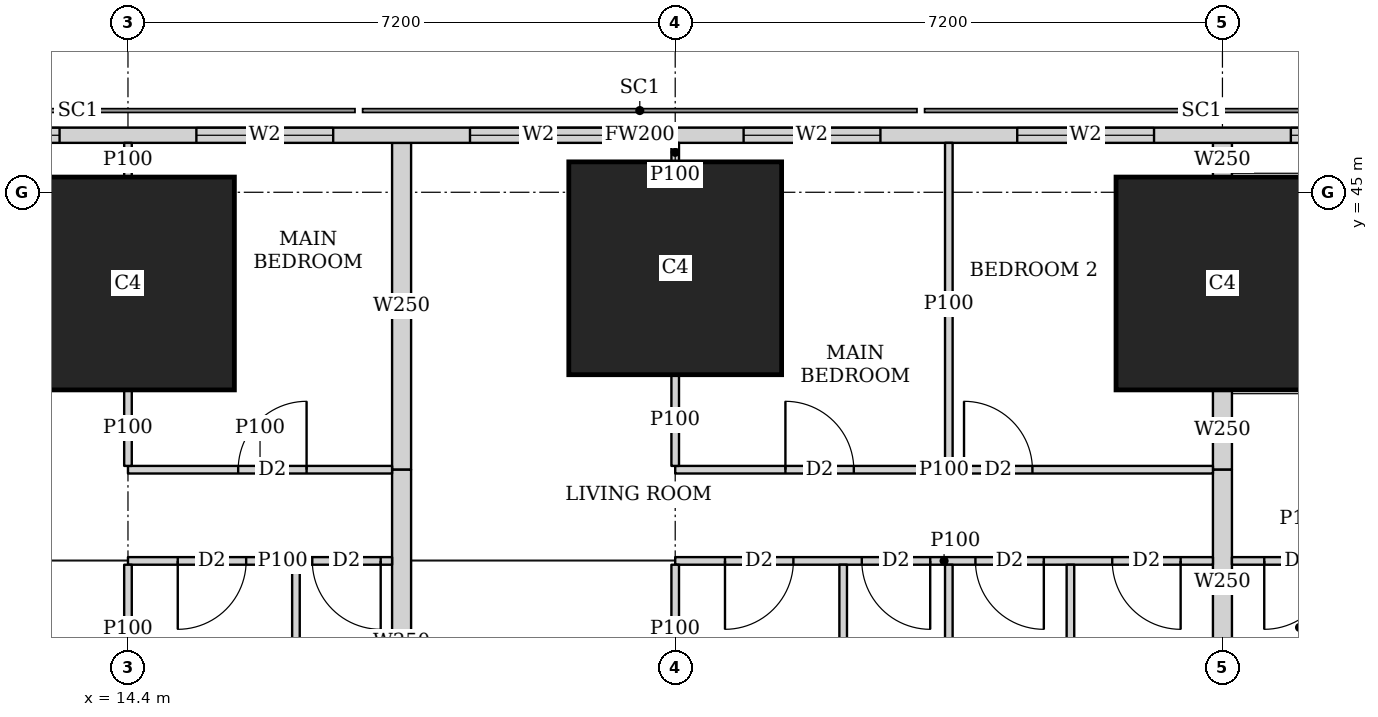
"""IFC4 building model, lengths in metres.
Left out: names, types, materials, properties, quantities, classifications, styles, units other than length and angle.
Written with IfcOpenShell. Run it as: python <this file> out.ifc"""

import sys

from ifc_helpers import new_model, si_unit, direction, frame, frame_2d, origin, origin_2d, place, context, subcontext, project, spatial, rectangle, extrude, element, fill, save


model = new_model("IFC4")
c1 = context("Model", 3, precision=1e-05, world=origin(), true_north=direction((0.0, 1.0)))
c2 = subcontext(c1, "Body", "Model", "MODEL_VIEW")
j1 = project(units=[si_unit("LENGTHUNIT", "METRE"), si_unit("PLANEANGLEUNIT", "RADIAN")], contexts=[c1])
p1 = place(None, origin())
s1 = spatial("IfcSite", under=j1, at=p1, CompositionType="ELEMENT")
p2 = place(p1, origin())
s2 = spatial("IfcBuilding", under=s1, at=p2, CompositionType="ELEMENT")
p3 = place(p2, frame((0.0, 0.0, 53.75)))
s3 = spatial("IfcBuildingStorey", under=s2, at=p3, CompositionType="ELEMENT", Elevation=53.75)
for number, where, z_axis, x_axis in (
    (1, (14.4, 43.8, 0.0), (0.0, 0.0, 1.0), (1.0, 0.0, 0.0)),
    (2, (21.6, 44.0, 0.0), (0.0, 0.0, 1.0), (1.0, 0.0, 0.0)),
    (3, (28.8, 43.8, 0.0), (0.0, 0.0, 1.0), (1.0, 0.0, 0.0)),
):
    element("IfcColumn", number, at=place(p3, frame(where, z_axis=z_axis, x_axis=x_axis)), inside=s3, PredefinedType="COLUMN", context=c2, shape_type="SweptSolid", body=[
        extrude(rectangle(XDim=2.8, YDim=2.8, at=origin_2d()), origin(), (0.0, 0.0, 1.0), 3.75),
    ])
p4 = place(p3, frame((40.106, 45.75, 0.0), z_axis=(0.0, 0.0, 1.0), x_axis=(-1.0, 0.0, 0.0)))
e4 = element("IfcWall", 4, at=p4, inside=s3, PredefinedType="SOLIDWALL", context=c2, shape_type="SweptSolid", body=[
    extrude(rectangle(XDim=37.943, YDim=0.2, at=frame_2d((18.971, 0.0))), origin(), (0.0, 0.0, 1.0), 3.5),
])
p5 = place(p4, frame((8.606, 0.0, 0.9)))
e5 = element("IfcOpeningElement", 5, at=p5, cuts=e4, PredefinedType="OPENING", context=c2, shape_type="SweptSolid", body=[
    extrude(rectangle(XDim=1.8, YDim=1.5, at=frame_2d((0.9, 0.75))), frame((0.0, 0.11, 0.0), z_axis=(0.0, -1.0, 0.0), x_axis=(1.0, 0.0, 0.0)), (0.0, 0.0, 1.0), 0.22),
])
p6 = place(p4, frame((12.206, 0.0, 0.9)))
e6 = element("IfcOpeningElement", 6, at=p6, cuts=e4, PredefinedType="OPENING", context=c2, shape_type="SweptSolid", body=[
    extrude(rectangle(XDim=1.8, YDim=1.5, at=frame_2d((0.9, 0.75))), frame((0.0, 0.11, 0.0), z_axis=(0.0, -1.0, 0.0), x_axis=(1.0, 0.0, 0.0)), (0.0, 0.0, 1.0), 0.22),
])
p7 = place(p4, frame((15.806, 0.0, 0.9)))
e7 = element("IfcOpeningElement", 7, at=p7, cuts=e4, PredefinedType="OPENING", context=c2, shape_type="SweptSolid", body=[
    extrude(rectangle(XDim=1.8, YDim=1.5, at=frame_2d((0.9, 0.75))), frame((0.0, 0.11, 0.0), z_axis=(0.0, -1.0, 0.0), x_axis=(1.0, 0.0, 0.0)), (0.0, 0.0, 1.0), 0.22),
])
p8 = place(p4, frame((19.406, 0.0, 0.9)))
e8 = element("IfcOpeningElement", 8, at=p8, cuts=e4, PredefinedType="OPENING", context=c2, shape_type="SweptSolid", body=[
    extrude(rectangle(XDim=1.8, YDim=1.5, at=frame_2d((0.9, 0.75))), frame((0.0, 0.11, 0.0), z_axis=(0.0, -1.0, 0.0), x_axis=(1.0, 0.0, 0.0)), (0.0, 0.0, 1.0), 0.22),
])
p9 = place(p4, frame((23.006, 0.0, 0.9)))
e9 = element("IfcOpeningElement", 9, at=p9, cuts=e4, PredefinedType="OPENING", context=c2, shape_type="SweptSolid", body=[
    extrude(rectangle(XDim=1.8, YDim=1.5, at=frame_2d((0.9, 0.75))), frame((0.0, 0.11, 0.0), z_axis=(0.0, -1.0, 0.0), x_axis=(1.0, 0.0, 0.0)), (0.0, 0.0, 1.0), 0.22),
])
p10 = place(p4, frame((26.606, 0.0, 0.9)))
e10 = element("IfcOpeningElement", 10, at=p10, cuts=e4, PredefinedType="OPENING", context=c2, shape_type="SweptSolid", body=[
    extrude(rectangle(XDim=1.8, YDim=1.5, at=frame_2d((0.9, 0.75))), frame((0.0, 0.11, 0.0), z_axis=(0.0, -1.0, 0.0), x_axis=(1.0, 0.0, 0.0)), (0.0, 0.0, 1.0), 0.22),
])
p11 = place(p3, frame((14.4, 41.35, 0.0), z_axis=(0.0, 0.0, 1.0), x_axis=(1.0, 0.0, 0.0)))
e11 = element("IfcWall", 11, at=p11, inside=s3, PredefinedType="PARTITIONING", context=c2, shape_type="SweptSolid", body=[
    extrude(rectangle(XDim=3.475, YDim=0.1, at=frame_2d((1.738, 0.0))), origin(), (0.0, 0.0, 1.0), 3.5),
])
p12 = place(p11, frame((1.45, 0.0, 0.0)))
e12 = element("IfcOpeningElement", 12, at=p12, cuts=e11, PredefinedType="OPENING", context=c2, shape_type="SweptSolid", body=[
    extrude(rectangle(XDim=0.9, YDim=2.1, at=frame_2d((0.45, 1.05))), frame((0.0, 0.06, 0.0), z_axis=(0.0, -1.0, 0.0), x_axis=(1.0, 0.0, 0.0)), (0.0, 0.0, 1.0), 0.12),
])
p13 = place(p3, frame((14.4, 40.15, 0.0), z_axis=(0.0, 0.0, 1.0), x_axis=(1.0, 0.0, 0.0)))
e13 = element("IfcWall", 13, at=p13, inside=s3, PredefinedType="PARTITIONING", context=c2, shape_type="SweptSolid", body=[
    extrude(rectangle(XDim=3.475, YDim=0.1, at=frame_2d((1.738, 0.0))), origin(), (0.0, 0.0, 1.0), 3.5),
])
p14 = place(p13, frame((0.655, 0.0, 0.0)))
e14 = element("IfcOpeningElement", 14, at=p14, cuts=e13, PredefinedType="OPENING", context=c2, shape_type="SweptSolid", body=[
    extrude(rectangle(XDim=0.9, YDim=2.1, at=frame_2d((0.45, 1.05))), frame((0.0, 0.06, 0.0), z_axis=(0.0, -1.0, 0.0), x_axis=(1.0, 0.0, 0.0)), (0.0, 0.0, 1.0), 0.12),
])
p15 = place(p13, frame((2.425, 0.0, 0.0)))
e15 = element("IfcOpeningElement", 15, at=p15, cuts=e13, PredefinedType="OPENING", context=c2, shape_type="SweptSolid", body=[
    extrude(rectangle(XDim=0.9, YDim=2.1, at=frame_2d((0.45, 1.05))), frame((0.0, 0.06, 0.0), z_axis=(0.0, -1.0, 0.0), x_axis=(1.0, 0.0, 0.0)), (0.0, 0.0, 1.0), 0.12),
])
p16 = place(p3, frame((14.4, 41.4, 0.0), z_axis=(0.0, 0.0, 1.0), x_axis=(0.0, 1.0, 0.0)))
e16 = element("IfcWall", 16, at=p16, inside=s3, PredefinedType="PARTITIONING", context=c2, shape_type="SweptSolid", body=[
    extrude(rectangle(XDim=0.999, YDim=0.1, at=frame_2d((0.5, 0.0))), origin(), (0.0, 0.0, 1.0), 3.5),
])
p17 = place(p3, frame((14.4, 45.201, 0.0), z_axis=(0.0, 0.0, 1.0), x_axis=(0.0, 1.0, 0.0)))
e17 = element("IfcWall", 17, at=p17, inside=s3, PredefinedType="PARTITIONING", context=c2, shape_type="SweptSolid", body=[
    extrude(rectangle(XDim=0.449, YDim=0.1, at=frame_2d((0.225, 0.0))), origin(), (0.0, 0.0, 1.0), 3.5),
])
p18 = place(p3, frame((14.4, 38.401, 0.0), z_axis=(0.0, 0.0, 1.0), x_axis=(0.0, 1.0, 0.0)))
e18 = element("IfcWall", 18, at=p18, inside=s3, PredefinedType="PARTITIONING", context=c2, shape_type="SweptSolid", body=[
    extrude(rectangle(XDim=1.699, YDim=0.1, at=frame_2d((0.85, 0.0))), origin(), (0.0, 0.0, 1.0), 3.5),
])
p19 = place(p3, frame((16.61, 36.825, 0.0), z_axis=(0.0, 0.0, 1.0), x_axis=(0.0, 1.0, 0.0)))
e19 = element("IfcWall", 19, at=p19, inside=s3, PredefinedType="PARTITIONING", context=c2, shape_type="SweptSolid", body=[
    extrude(rectangle(XDim=3.275, YDim=0.1, at=frame_2d((1.638, 0.0))), origin(), (0.0, 0.0, 1.0), 3.5),
])
p20 = place(p3, frame((21.6, 41.35, 0.0), z_axis=(0.0, 0.0, 1.0), x_axis=(1.0, 0.0, 0.0)))
e20 = element("IfcWall", 20, at=p20, inside=s3, PredefinedType="PARTITIONING", context=c2, shape_type="SweptSolid", body=[
    extrude(rectangle(XDim=7.075, YDim=0.1, at=frame_2d((3.538, 0.0))), origin(), (0.0, 0.0, 1.0), 3.5),
])
p21 = place(p20, frame((1.45, 0.0, 0.0)))
e21 = element("IfcOpeningElement", 21, at=p21, cuts=e20, PredefinedType="OPENING", context=c2, shape_type="SweptSolid", body=[
    extrude(rectangle(XDim=0.9, YDim=2.1, at=frame_2d((0.45, 1.05))), frame((0.0, 0.06, 0.0), z_axis=(0.0, -1.0, 0.0), x_axis=(1.0, 0.0, 0.0)), (0.0, 0.0, 1.0), 0.12),
])
p22 = place(p20, frame((3.8, 0.0, 0.0)))
e22 = element("IfcOpeningElement", 22, at=p22, cuts=e20, PredefinedType="OPENING", context=c2, shape_type="SweptSolid", body=[
    extrude(rectangle(XDim=0.9, YDim=2.1, at=frame_2d((0.45, 1.05))), frame((0.0, 0.06, 0.0), z_axis=(0.0, -1.0, 0.0), x_axis=(1.0, 0.0, 0.0)), (0.0, 0.0, 1.0), 0.12),
])
p23 = place(p3, frame((21.6, 40.15, 0.0), z_axis=(0.0, 0.0, 1.0), x_axis=(1.0, 0.0, 0.0)))
e23 = element("IfcWall", 23, at=p23, inside=s3, PredefinedType="PARTITIONING", context=c2, shape_type="SweptSolid", body=[
    extrude(rectangle(XDim=7.075, YDim=0.1, at=frame_2d((3.538, 0.0))), origin(), (0.0, 0.0, 1.0), 3.5),
])
p24 = place(p23, frame((0.655, 0.0, 0.0)))
e24 = element("IfcOpeningElement", 24, at=p24, cuts=e23, PredefinedType="OPENING", context=c2, shape_type="SweptSolid", body=[
    extrude(rectangle(XDim=0.9, YDim=2.1, at=frame_2d((0.45, 1.05))), frame((0.0, 0.06, 0.0), z_axis=(0.0, -1.0, 0.0), x_axis=(1.0, 0.0, 0.0)), (0.0, 0.0, 1.0), 0.12),
])
p25 = place(p23, frame((3.95, 0.0, 0.0)))
e25 = element("IfcOpeningElement", 25, at=p25, cuts=e23, PredefinedType="OPENING", context=c2, shape_type="SweptSolid", body=[
    extrude(rectangle(XDim=0.9, YDim=2.1, at=frame_2d((0.45, 1.05))), frame((0.0, 0.06, 0.0), z_axis=(0.0, -1.0, 0.0), x_axis=(1.0, 0.0, 0.0)), (0.0, 0.0, 1.0), 0.12),
])
p26 = place(p23, frame((2.455, 0.0, 0.0)))
e26 = element("IfcOpeningElement", 26, at=p26, cuts=e23, PredefinedType="OPENING", context=c2, shape_type="SweptSolid", body=[
    extrude(rectangle(XDim=0.9, YDim=2.1, at=frame_2d((0.45, 1.05))), frame((0.0, 0.06, 0.0), z_axis=(0.0, -1.0, 0.0), x_axis=(1.0, 0.0, 0.0)), (0.0, 0.0, 1.0), 0.12),
])
p27 = place(p23, frame((5.75, 0.0, 0.0)))
e27 = element("IfcOpeningElement", 27, at=p27, cuts=e23, PredefinedType="OPENING", context=c2, shape_type="SweptSolid", body=[
    extrude(rectangle(XDim=0.9, YDim=2.1, at=frame_2d((0.45, 1.05))), frame((0.0, 0.06, 0.0), z_axis=(0.0, -1.0, 0.0), x_axis=(1.0, 0.0, 0.0)), (0.0, 0.0, 1.0), 0.12),
])
p28 = place(p3, frame((21.6, 41.4, 0.0), z_axis=(0.0, 0.0, 1.0), x_axis=(0.0, 1.0, 0.0)))
e28 = element("IfcWall", 28, at=p28, inside=s3, PredefinedType="PARTITIONING", context=c2, shape_type="SweptSolid", body=[
    extrude(rectangle(XDim=1.199, YDim=0.1, at=frame_2d((0.6, 0.0))), origin(), (0.0, 0.0, 1.0), 3.5),
])
p29 = place(p3, frame((21.6, 45.401, 0.0), z_axis=(0.0, 0.0, 1.0), x_axis=(0.0, 1.0, 0.0)))
e29 = element("IfcWall", 29, at=p29, inside=s3, PredefinedType="PARTITIONING", context=c2, shape_type="SweptSolid", body=[
    extrude(rectangle(XDim=0.249, YDim=0.1, at=frame_2d((0.125, 0.0))), origin(), (0.0, 0.0, 1.0), 3.5),
])
p30 = place(p3, frame((25.2, 41.4, 0.0), z_axis=(0.0, 0.0, 1.0), x_axis=(0.0, 1.0, 0.0)))
e30 = element("IfcWall", 30, at=p30, inside=s3, PredefinedType="PARTITIONING", context=c2, shape_type="SweptSolid", body=[
    extrude(rectangle(XDim=4.25, YDim=0.1, at=frame_2d((2.125, 0.0))), origin(), (0.0, 0.0, 1.0), 2.05),
])
p31 = place(p3, frame((21.6, 38.401, 0.0), z_axis=(0.0, 0.0, 1.0), x_axis=(0.0, 1.0, 0.0)))
e31 = element("IfcWall", 31, at=p31, inside=s3, PredefinedType="PARTITIONING", context=c2, shape_type="SweptSolid", body=[
    extrude(rectangle(XDim=1.699, YDim=0.1, at=frame_2d((0.85, 0.0))), origin(), (0.0, 0.0, 1.0), 3.5),
])
for number, where, z_axis, x_axis in (
    (32, (25.2, 36.825, 0.0), (0.0, 0.0, 1.0), (0.0, 1.0, 0.0)),
    (33, (23.81, 36.825, 0.0), (0.0, 0.0, 1.0), (0.0, 1.0, 0.0)),
    (34, (26.8, 36.825, 0.0), (0.0, 0.0, 1.0), (0.0, 1.0, 0.0)),
):
    element("IfcWall", number, at=place(p3, frame(where, z_axis=z_axis, x_axis=x_axis)), inside=s3, PredefinedType="PARTITIONING", context=c2, shape_type="SweptSolid", body=[
        extrude(rectangle(XDim=3.275, YDim=0.1, at=frame_2d((1.638, 0.0))), origin(), (0.0, 0.0, 1.0), 3.5),
    ])
p32 = place(p3, frame((18.0, 41.35, 0.0), z_axis=(0.0, 0.0, 1.0), x_axis=(0.0, 1.0, 0.0)))
e35 = element("IfcWall", 35, at=p32, inside=s3, PredefinedType="SOLIDWALL", context=c2, shape_type="SweptSolid", body=[
    extrude(rectangle(XDim=4.3, YDim=0.25, at=frame_2d((2.15, 0.0))), origin(), (0.0, 0.0, 1.0), 2.05),
])
p33 = place(p3, frame((18.0, 36.825, 0.0), z_axis=(0.0, 0.0, 1.0), x_axis=(0.0, 1.0, 0.0)))
e36 = element("IfcWall", 36, at=p33, inside=s3, PredefinedType="SOLIDWALL", context=c2, shape_type="SweptSolid", body=[
    extrude(rectangle(XDim=4.525, YDim=0.25, at=frame_2d((2.263, 0.0))), origin(), (0.0, 0.0, 1.0), 3.5),
])
p34 = place(p3, frame((28.925, 40.15, 0.0), z_axis=(0.0, 0.0, 1.0), x_axis=(1.0, 0.0, 0.0)))
e37 = element("IfcWall", 37, at=p34, inside=s3, PredefinedType="PARTITIONING", context=c2, shape_type="SweptSolid", body=[
    extrude(rectangle(XDim=1.904, YDim=0.1, at=frame_2d((0.952, 0.0))), origin(), (0.0, 0.0, 1.0), 3.5),
])
p35 = place(p34, frame((0.425, 0.0, 0.0)))
e38 = element("IfcOpeningElement", 38, at=p35, cuts=e37, PredefinedType="OPENING", context=c2, shape_type="SweptSolid", body=[
    extrude(rectangle(XDim=0.9, YDim=2.1, at=frame_2d((0.45, 1.05))), frame((0.0, 0.06, 0.0), z_axis=(0.0, -1.0, 0.0), x_axis=(1.0, 0.0, 0.0)), (0.0, 0.0, 1.0), 0.12),
])
p36 = place(p3, frame((28.8, 41.35, 0.0), z_axis=(0.0, 0.0, 1.0), x_axis=(0.0, 1.0, 0.0)))
e39 = element("IfcWall", 39, at=p36, inside=s3, PredefinedType="SOLIDWALL", context=c2, shape_type="SweptSolid", body=[
    extrude(rectangle(XDim=1.049, YDim=0.25, at=frame_2d((0.524, 0.0))), origin(), (0.0, 0.0, 1.0), 3.5),
])
p37 = place(p3, frame((28.8, 45.201, 0.0), z_axis=(0.0, 0.0, 1.0), x_axis=(0.0, 1.0, 0.0)))
e40 = element("IfcWall", 40, at=p37, inside=s3, PredefinedType="SOLIDWALL", context=c2, shape_type="SweptSolid", body=[
    extrude(rectangle(XDim=0.449, YDim=0.25, at=frame_2d((0.225, 0.0))), origin(), (0.0, 0.0, 1.0), 3.5),
])
p38 = place(p3, frame((28.8, 38.401, 0.0), z_axis=(0.0, 0.0, 1.0), x_axis=(0.0, 1.0, 0.0)))
e41 = element("IfcWall", 41, at=p38, inside=s3, PredefinedType="SOLIDWALL", context=c2, shape_type="SweptSolid", body=[
    extrude(rectangle(XDim=2.949, YDim=0.25, at=frame_2d((1.475, 0.0))), origin(), (0.0, 0.0, 1.0), 3.5),
])
p39 = place(p5, origin())
e42 = element("IfcWindow", 42, at=p39, inside=s3, PartitioningType="SINGLE_PANEL", PredefinedType="WINDOW", context=c2, shape_type="SweptSolid", body=[
    extrude(rectangle(XDim=1.8, YDim=1.5, at=frame_2d((0.9, 0.75))), frame((0.0, 0.03, 0.0), z_axis=(0.0, -1.0, 0.0), x_axis=(1.0, 0.0, 0.0)), (0.0, 0.0, 1.0), 0.06),
])
fill(e5, e42)
p40 = place(p6, origin())
e43 = element("IfcWindow", 43, at=p40, inside=s3, PartitioningType="SINGLE_PANEL", PredefinedType="WINDOW", context=c2, shape_type="SweptSolid", body=[
    extrude(rectangle(XDim=1.8, YDim=1.5, at=frame_2d((0.9, 0.75))), frame((0.0, 0.03, 0.0), z_axis=(0.0, -1.0, 0.0), x_axis=(1.0, 0.0, 0.0)), (0.0, 0.0, 1.0), 0.06),
])
fill(e6, e43)
p41 = place(p7, origin())
e44 = element("IfcWindow", 44, at=p41, inside=s3, PartitioningType="SINGLE_PANEL", PredefinedType="WINDOW", context=c2, shape_type="SweptSolid", body=[
    extrude(rectangle(XDim=1.8, YDim=1.5, at=frame_2d((0.9, 0.75))), frame((0.0, 0.03, 0.0), z_axis=(0.0, -1.0, 0.0), x_axis=(1.0, 0.0, 0.0)), (0.0, 0.0, 1.0), 0.06),
])
fill(e7, e44)
p42 = place(p8, origin())
e45 = element("IfcWindow", 45, at=p42, inside=s3, PartitioningType="SINGLE_PANEL", PredefinedType="WINDOW", context=c2, shape_type="SweptSolid", body=[
    extrude(rectangle(XDim=1.8, YDim=1.5, at=frame_2d((0.9, 0.75))), frame((0.0, 0.03, 0.0), z_axis=(0.0, -1.0, 0.0), x_axis=(1.0, 0.0, 0.0)), (0.0, 0.0, 1.0), 0.06),
])
fill(e8, e45)
p43 = place(p9, origin())
e46 = element("IfcWindow", 46, at=p43, inside=s3, PartitioningType="SINGLE_PANEL", PredefinedType="WINDOW", context=c2, shape_type="SweptSolid", body=[
    extrude(rectangle(XDim=1.8, YDim=1.5, at=frame_2d((0.9, 0.75))), frame((0.0, 0.03, 0.0), z_axis=(0.0, -1.0, 0.0), x_axis=(1.0, 0.0, 0.0)), (0.0, 0.0, 1.0), 0.06),
])
fill(e9, e46)
p44 = place(p10, origin())
e47 = element("IfcWindow", 47, at=p44, inside=s3, PartitioningType="SINGLE_PANEL", PredefinedType="WINDOW", context=c2, shape_type="SweptSolid", body=[
    extrude(rectangle(XDim=1.8, YDim=1.5, at=frame_2d((0.9, 0.75))), frame((0.0, 0.03, 0.0), z_axis=(0.0, -1.0, 0.0), x_axis=(1.0, 0.0, 0.0)), (0.0, 0.0, 1.0), 0.06),
])
fill(e10, e47)
p45 = place(p12, origin())
e48 = element("IfcDoor", 48, at=p45, inside=s3, OperationType="SINGLE_SWING_RIGHT", PredefinedType="DOOR", context=c2, shape_type="SweptSolid", body=[
    extrude(rectangle(XDim=0.9, YDim=2.1, at=frame_2d((0.45, 1.05))), frame((0.0, 0.025, 0.0), z_axis=(0.0, -1.0, 0.0), x_axis=(1.0, 0.0, 0.0)), (0.0, 0.0, 1.0), 0.05),
])
fill(e12, e48)
p46 = place(p14, origin())
e49 = element("IfcDoor", 49, at=p46, inside=s3, OperationType="SINGLE_SWING_RIGHT", PredefinedType="DOOR", context=c2, shape_type="SweptSolid", body=[
    extrude(rectangle(XDim=0.9, YDim=2.1, at=frame_2d((0.45, 1.05))), frame((0.0, 0.025, 0.0), z_axis=(0.0, -1.0, 0.0), x_axis=(1.0, 0.0, 0.0)), (0.0, 0.0, 1.0), 0.05),
])
fill(e14, e49)
p47 = place(p15, origin())
e50 = element("IfcDoor", 50, at=p47, inside=s3, OperationType="SINGLE_SWING_LEFT", PredefinedType="DOOR", context=c2, shape_type="SweptSolid", body=[
    extrude(rectangle(XDim=0.9, YDim=2.1, at=frame_2d((0.45, 1.05))), frame((0.0, 0.025, 0.0), z_axis=(0.0, -1.0, 0.0), x_axis=(1.0, 0.0, 0.0)), (0.0, 0.0, 1.0), 0.05),
])
fill(e15, e50)
p48 = place(p21, origin())
e51 = element("IfcDoor", 51, at=p48, inside=s3, OperationType="SINGLE_SWING_LEFT", PredefinedType="DOOR", context=c2, shape_type="SweptSolid", body=[
    extrude(rectangle(XDim=0.9, YDim=2.1, at=frame_2d((0.45, 1.05))), frame((0.0, 0.025, 0.0), z_axis=(0.0, -1.0, 0.0), x_axis=(1.0, 0.0, 0.0)), (0.0, 0.0, 1.0), 0.05),
])
fill(e21, e51)
p49 = place(p22, origin())
e52 = element("IfcDoor", 52, at=p49, inside=s3, OperationType="SINGLE_SWING_LEFT", PredefinedType="DOOR", context=c2, shape_type="SweptSolid", body=[
    extrude(rectangle(XDim=0.9, YDim=2.1, at=frame_2d((0.45, 1.05))), frame((0.0, 0.025, 0.0), z_axis=(0.0, -1.0, 0.0), x_axis=(1.0, 0.0, 0.0)), (0.0, 0.0, 1.0), 0.05),
])
fill(e22, e52)
p50 = place(p24, origin())
e53 = element("IfcDoor", 53, at=p50, inside=s3, OperationType="SINGLE_SWING_RIGHT", PredefinedType="DOOR", context=c2, shape_type="SweptSolid", body=[
    extrude(rectangle(XDim=0.9, YDim=2.1, at=frame_2d((0.45, 1.05))), frame((0.0, 0.025, 0.0), z_axis=(0.0, -1.0, 0.0), x_axis=(1.0, 0.0, 0.0)), (0.0, 0.0, 1.0), 0.05),
])
fill(e24, e53)
p51 = place(p25, origin())
e54 = element("IfcDoor", 54, at=p51, inside=s3, OperationType="SINGLE_SWING_LEFT", PredefinedType="DOOR", context=c2, shape_type="SweptSolid", body=[
    extrude(rectangle(XDim=0.9, YDim=2.1, at=frame_2d((0.45, 1.05))), frame((0.0, 0.025, 0.0), z_axis=(0.0, -1.0, 0.0), x_axis=(1.0, 0.0, 0.0)), (0.0, 0.0, 1.0), 0.05),
])
fill(e25, e54)
p52 = place(p26, origin())
e55 = element("IfcDoor", 55, at=p52, inside=s3, OperationType="SINGLE_SWING_LEFT", PredefinedType="DOOR", context=c2, shape_type="SweptSolid", body=[
    extrude(rectangle(XDim=0.9, YDim=2.1, at=frame_2d((0.45, 1.05))), frame((0.0, 0.025, 0.0), z_axis=(0.0, -1.0, 0.0), x_axis=(1.0, 0.0, 0.0)), (0.0, 0.0, 1.0), 0.05),
])
fill(e26, e55)
p53 = place(p27, origin())
e56 = element("IfcDoor", 56, at=p53, inside=s3, OperationType="SINGLE_SWING_LEFT", PredefinedType="DOOR", context=c2, shape_type="SweptSolid", body=[
    extrude(rectangle(XDim=0.9, YDim=2.1, at=frame_2d((0.45, 1.05))), frame((0.0, 0.025, 0.0), z_axis=(0.0, -1.0, 0.0), x_axis=(1.0, 0.0, 0.0)), (0.0, 0.0, 1.0), 0.05),
])
fill(e27, e56)
p54 = place(p35, origin())
e57 = element("IfcDoor", 57, at=p54, inside=s3, OperationType="SINGLE_SWING_RIGHT", PredefinedType="DOOR", context=c2, shape_type="SweptSolid", body=[
    extrude(rectangle(XDim=0.9, YDim=2.1, at=frame_2d((0.45, 1.05))), frame((0.0, 0.025, 0.0), z_axis=(0.0, -1.0, 0.0), x_axis=(1.0, 0.0, 0.0)), (0.0, 0.0, 1.0), 0.05),
])
fill(e38, e57)
save(model, sys.argv[1])
